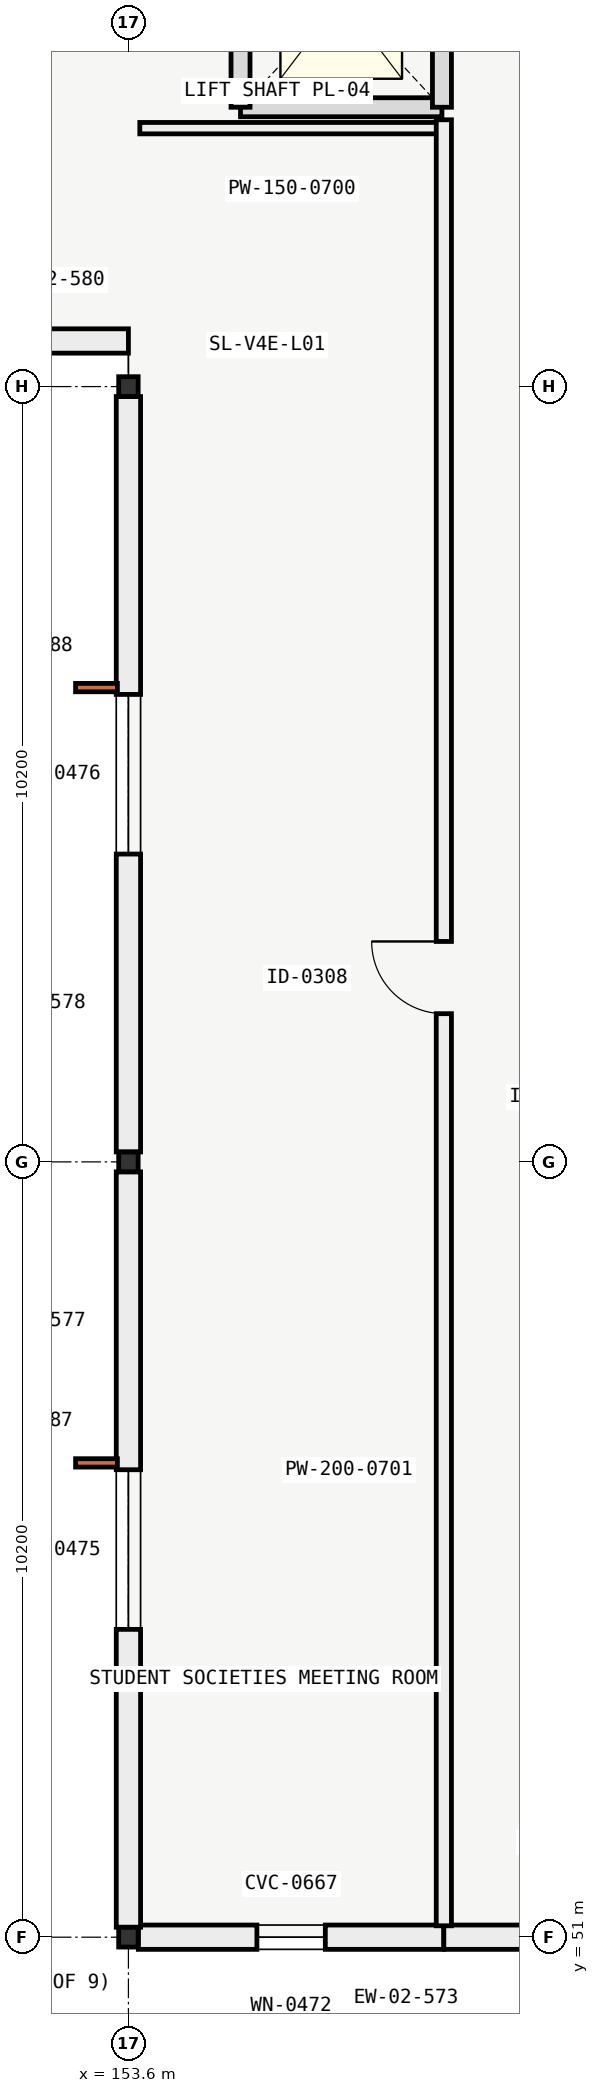
"""IFC4 building model, lengths in metres.
Left out: names, types, materials, properties, quantities, classifications, styles, units other than length and angle.
Written with IfcOpenShell. Run it as: python <this file> out.ifc"""

import sys

from ifc_helpers import new_model, si_unit, direction, frame, frame_2d, origin, origin_2d, place, context, subcontext, project, spatial, rectangle, i_section, extrude, element, fill, save


model = new_model("IFC4")
c1 = context("Model", 3, precision=1e-05, world=origin(), true_north=direction((0.0, 1.0)))
c2 = subcontext(c1, "Body", "Model", "MODEL_VIEW")
j1 = project(units=[si_unit("LENGTHUNIT", "METRE"), si_unit("PLANEANGLEUNIT", "RADIAN")], contexts=[c1])
p1 = place(None, origin())
s1 = spatial("IfcSite", under=j1, at=p1, CompositionType="ELEMENT")
p2 = place(p1, origin())
s2 = spatial("IfcBuilding", under=s1, at=p2, CompositionType="ELEMENT")
p3 = place(p2, frame((0.0, 0.0, 5.4)))
s3 = spatial("IfcBuildingStorey", under=s2, at=p3, CompositionType="ELEMENT", Elevation=5.4)
for number, where, z_axis, x_axis in (
    (1, (153.6, 51.0, 0.0), (0.0, 0.0, 1.0), (1.0, 0.0, 0.0)),
    (2, (153.6, 61.2, 0.0), (0.0, 0.0, 1.0), (1.0, 0.0, 0.0)),
    (3, (153.6, 71.4, 0.0), (0.0, 0.0, 1.0), (1.0, 0.0, 0.0)),
):
    element("IfcColumn", number, at=place(p3, frame(where, z_axis=z_axis, x_axis=x_axis)), inside=s3, PredefinedType="COLUMN", context=c2, shape_type="SweptSolid", body=[
        extrude(i_section(OverallWidth=0.256, OverallDepth=0.26, WebThickness=0.01, FlangeThickness=0.017, FilletRadius=0.014, at=origin_2d()), origin(), (0.0, 0.0, 1.0), 4.2),
    ])
p4 = place(p3, frame((157.75, 51.0, 0.0), z_axis=(0.0, 0.0, 1.0), x_axis=(-1.0, 0.0, 0.0)))
e4 = element("IfcWall", 4, at=p4, inside=s3, PredefinedType="SOLIDWALL", context=c2, shape_type="SweptSolid", body=[
    extrude(rectangle(XDim=4.019, YDim=0.32, at=frame_2d((2.01, 0.0))), origin(), (0.0, 0.0, 1.0), 3.46),
])
p5 = place(p4, frame((1.56, 0.0, 0.85)))
e5 = element("IfcOpeningElement", 5, at=p5, cuts=e4, PredefinedType="OPENING", context=c2, shape_type="SweptSolid", body=[
    extrude(rectangle(XDim=0.9, YDim=2.2, at=frame_2d((0.45, 1.1))), frame((0.0, 0.17, 0.0), z_axis=(0.0, -1.0, 0.0), x_axis=(1.0, 0.0, 0.0)), (0.0, 0.0, 1.0), 0.34),
])
p6 = place(p3, frame((160.95, 51.0, 0.0), z_axis=(0.0, 0.0, 1.0), x_axis=(-1.0, 0.0, 0.0)))
e6 = element("IfcWall", 6, at=p6, inside=s3, PredefinedType="SOLIDWALL", context=c2, shape_type="SweptSolid", body=[
    extrude(rectangle(XDim=3.2, YDim=0.32, at=frame_2d((1.6, 0.0))), origin(), (0.0, 0.0, 1.0), 3.46),
])
p7 = place(p6, frame((1.15, 0.0, 0.85)))
e7 = element("IfcOpeningElement", 7, at=p7, cuts=e6, PredefinedType="OPENING", context=c2, shape_type="SweptSolid", body=[
    extrude(rectangle(XDim=0.9, YDim=2.2, at=frame_2d((0.45, 1.1))), frame((0.0, 0.17, 0.0), z_axis=(0.0, -1.0, 0.0), x_axis=(1.0, 0.0, 0.0)), (0.0, 0.0, 1.0), 0.34),
])
p8 = place(p3, frame((153.6, 51.131, 0.0), z_axis=(0.0, 0.0, 1.0), x_axis=(0.0, 1.0, 0.0)))
e8 = element("IfcWall", 8, at=p8, inside=s3, PredefinedType="SOLIDWALL", context=c2, shape_type="SweptSolid", body=[
    extrude(rectangle(XDim=9.938, YDim=0.32, at=frame_2d((4.969, 0.0))), origin(), (0.0, 0.0, 1.0), 3.514),
])
p9 = place(p8, frame((3.919, 0.0, 0.85)))
e9 = element("IfcOpeningElement", 9, at=p9, cuts=e8, PredefinedType="OPENING", context=c2, shape_type="SweptSolid", body=[
    extrude(rectangle(XDim=2.1, YDim=2.4, at=frame_2d((1.05, 1.2))), frame((0.0, 0.17, 0.0), z_axis=(0.0, -1.0, 0.0), x_axis=(1.0, 0.0, 0.0)), (0.0, 0.0, 1.0), 0.34),
])
p10 = place(p3, frame((153.6, 61.331, 0.0), z_axis=(0.0, 0.0, 1.0), x_axis=(0.0, 1.0, 0.0)))
e10 = element("IfcWall", 10, at=p10, inside=s3, PredefinedType="SOLIDWALL", context=c2, shape_type="SweptSolid", body=[
    extrude(rectangle(XDim=9.938, YDim=0.32, at=frame_2d((4.969, 0.0))), origin(), (0.0, 0.0, 1.0), 3.514),
])
p11 = place(p10, frame((3.919, 0.0, 0.85)))
e11 = element("IfcOpeningElement", 11, at=p11, cuts=e10, PredefinedType="OPENING", context=c2, shape_type="SweptSolid", body=[
    extrude(rectangle(XDim=2.1, YDim=2.4, at=frame_2d((1.05, 1.2))), frame((0.0, 0.17, 0.0), z_axis=(0.0, -1.0, 0.0), x_axis=(1.0, 0.0, 0.0)), (0.0, 0.0, 1.0), 0.34),
])
p12 = place(p3, frame((153.6, 72.0, 0.0), z_axis=(0.0, 0.0, 1.0), x_axis=(-1.0, 0.0, 0.0)))
e12 = element("IfcWall", 12, at=p12, inside=s3, PredefinedType="SOLIDWALL", context=c2, shape_type="SweptSolid", body=[
    extrude(rectangle(XDim=5.299, YDim=0.32, at=frame_2d((2.649, 0.0))), origin(), (0.0, 0.0, 1.0), 3.494),
])
p13 = place(p12, frame((2.0, 0.0, 0.9)))
e13 = element("IfcOpeningElement", 13, at=p13, cuts=e12, PredefinedType="OPENING", context=c2, shape_type="SweptSolid", body=[
    extrude(rectangle(XDim=1.3, YDim=1.75, at=frame_2d((0.65, 0.875))), frame((0.0, 0.17, 0.0), z_axis=(0.0, -1.0, 0.0), x_axis=(1.0, 0.0, 0.0)), (0.0, 0.0, 1.0), 0.34),
])
p14 = place(p3, frame((155.075, 75.075, 0.0), z_axis=(0.0, 0.0, 1.0), x_axis=(1.0, 0.0, 0.0)))
e14 = element("IfcWall", 14, at=p14, inside=s3, PredefinedType="SOLIDWALL", context=c2, shape_type="SweptSolid", body=[
    extrude(rectangle(XDim=2.65, YDim=0.25, at=frame_2d((1.325, 0.0))), origin(), (0.0, 0.0, 1.0), 3.92),
])
p15 = place(p3, frame((157.725, 75.075, 0.0), z_axis=(0.0, 0.0, 1.0), x_axis=(0.0, 1.0, 0.0)))
e15 = element("IfcWall", 15, at=p15, inside=s3, PredefinedType="SOLIDWALL", context=c2, shape_type="SweptSolid", body=[
    extrude(rectangle(XDim=2.85, YDim=0.25, at=frame_2d((1.425, 0.0))), origin(), (0.0, 0.0, 1.0), 3.92),
])
p16 = place(p15, frame((0.875, 0.0, 0.0)))
e16 = element("IfcOpeningElement", 16, at=p16, cuts=e15, PredefinedType="OPENING", context=c2, shape_type="SweptSolid", body=[
    extrude(rectangle(XDim=1.1, YDim=2.1, at=frame_2d((0.55, 1.05))), frame((0.0, 0.135, 0.0), z_axis=(0.0, -1.0, 0.0), x_axis=(1.0, 0.0, 0.0)), (0.0, 0.0, 1.0), 0.27),
])
p17 = place(p3, frame((155.075, 77.925, 0.0), z_axis=(0.0, 0.0, 1.0), x_axis=(0.0, -1.0, 0.0)))
e17 = element("IfcWall", 17, at=p17, inside=s3, PredefinedType="SOLIDWALL", context=c2, shape_type="SweptSolid", body=[
    extrude(rectangle(XDim=2.85, YDim=0.25, at=frame_2d((1.425, 0.0))), origin(), (0.0, 0.0, 1.0), 3.92),
])
p18 = place(p3, frame((153.75, 74.8, 0.0), z_axis=(0.0, 0.0, 1.0), x_axis=(1.0, 0.0, 0.0)))
e18 = element("IfcWall", 18, at=p18, inside=s3, PredefinedType="PARTITIONING", context=c2, shape_type="SweptSolid", body=[
    extrude(rectangle(XDim=4.0, YDim=0.15, at=frame_2d((2.0, 0.0))), origin(), (0.0, 0.0, 1.0), 3.85),
])
p19 = place(p3, frame((157.75, 51.15, 0.0), z_axis=(0.0, 0.0, 1.0), x_axis=(0.0, 1.0, 0.0)))
e19 = element("IfcWall", 19, at=p19, inside=s3, PredefinedType="PARTITIONING", context=c2, shape_type="SweptSolid", body=[
    extrude(rectangle(XDim=23.76, YDim=0.2, at=frame_2d((11.88, 0.0))), origin(), (0.0, 0.0, 1.0), 3.44),
])
p20 = place(p19, frame((12.0, 0.0, 0.0)))
e20 = element("IfcOpeningElement", 20, at=p20, cuts=e19, PredefinedType="OPENING", context=c2, shape_type="SweptSolid", body=[
    extrude(rectangle(XDim=0.95, YDim=2.1, at=frame_2d((0.475, 1.05))), frame((0.0, 0.11, 0.0), z_axis=(0.0, -1.0, 0.0), x_axis=(1.0, 0.0, 0.0)), (0.0, 0.0, 1.0), 0.22),
])
p21 = place(p5, origin())
e21 = element("IfcWindow", 21, at=p21, inside=s3, PartitioningType="SINGLE_PANEL", PredefinedType="WINDOW", context=c2, shape_type="SweptSolid", body=[
    extrude(rectangle(XDim=0.9, YDim=2.2, at=frame_2d((0.45, 1.1))), frame((0.0, 0.03, 0.0), z_axis=(0.0, -1.0, 0.0), x_axis=(1.0, 0.0, 0.0)), (0.0, 0.0, 1.0), 0.06),
])
fill(e5, e21)
p22 = place(p9, origin())
e22 = element("IfcWindow", 22, at=p22, inside=s3, PartitioningType="SINGLE_PANEL", PredefinedType="WINDOW", context=c2, shape_type="SweptSolid", body=[
    extrude(rectangle(XDim=2.1, YDim=2.4, at=frame_2d((1.05, 1.2))), frame((0.0, 0.03, 0.0), z_axis=(0.0, -1.0, 0.0), x_axis=(1.0, 0.0, 0.0)), (0.0, 0.0, 1.0), 0.06),
])
fill(e9, e22)
p23 = place(p11, origin())
e23 = element("IfcWindow", 23, at=p23, inside=s3, PartitioningType="SINGLE_PANEL", PredefinedType="WINDOW", context=c2, shape_type="SweptSolid", body=[
    extrude(rectangle(XDim=2.1, YDim=2.4, at=frame_2d((1.05, 1.2))), frame((0.0, 0.03, 0.0), z_axis=(0.0, -1.0, 0.0), x_axis=(1.0, 0.0, 0.0)), (0.0, 0.0, 1.0), 0.06),
])
fill(e11, e23)
p24 = place(p20, origin())
e24 = element("IfcDoor", 24, at=p24, inside=s3, OperationType="SINGLE_SWING_RIGHT", PredefinedType="DOOR", context=c2, shape_type="SweptSolid", body=[
    extrude(rectangle(XDim=0.95, YDim=2.1, at=frame_2d((0.475, 1.05))), frame((0.0, 0.025, 0.0), z_axis=(0.0, -1.0, 0.0), x_axis=(1.0, 0.0, 0.0)), (0.0, 0.0, 1.0), 0.05),
])
fill(e20, e24)
save(model, sys.argv[1])
